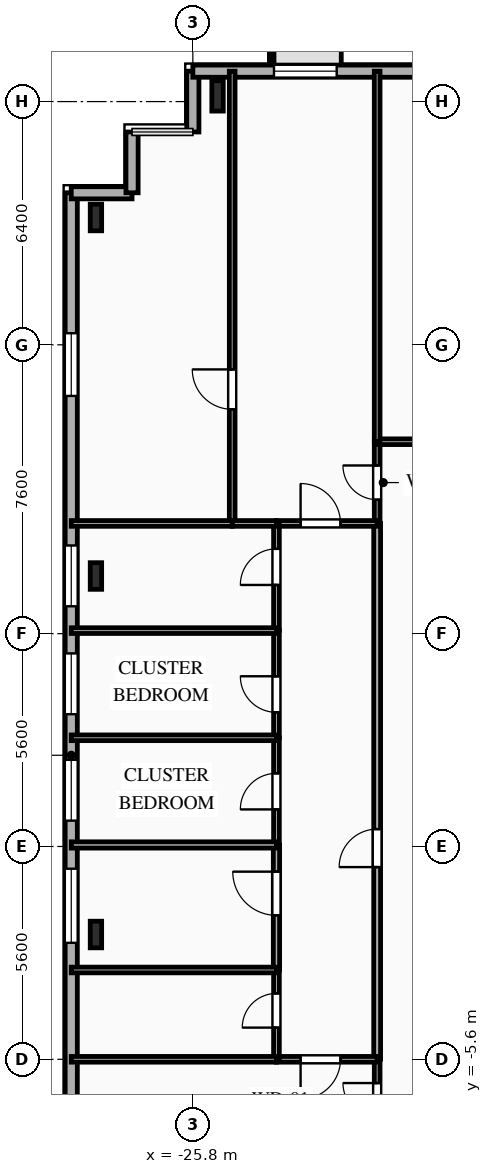
"""IFC4 building model, lengths in metres.
Left out: names, types, materials, properties, quantities, classifications, styles, units other than length and angle.
Written with IfcOpenShell. Run it as: python <this file> out.ifc"""

import sys

from ifc_helpers import new_model, si_unit, direction, frame, frame_2d, origin, origin_2d, place, context, subcontext, project, spatial, rectangle, i_section, extrude, element, fill, save


model = new_model("IFC4")
c1 = context("Model", 3, precision=1e-05, world=origin(), true_north=direction((0.0, 1.0)))
c2 = subcontext(c1, "Body", "Model", "MODEL_VIEW")
j1 = project(units=[si_unit("LENGTHUNIT", "METRE"), si_unit("PLANEANGLEUNIT", "RADIAN")], contexts=[c1])
p1 = place(None, origin())
s1 = spatial("IfcSite", under=j1, at=p1, CompositionType="ELEMENT")
p2 = place(p1, origin())
s2 = spatial("IfcBuilding", under=s1, at=p2, CompositionType="ELEMENT")
p3 = place(p2, frame((0.0, 0.0, 147.75)))
s3 = spatial("IfcBuildingStorey", under=s2, at=p3, CompositionType="ELEMENT", Elevation=147.75)
p4 = place(p3, frame((-25.15, 19.75, 0.0), z_axis=(0.0, 0.0, 1.0), x_axis=(1.0, 0.0, 0.0)))
e1 = element("IfcColumn", 1, at=p4, inside=s3, PredefinedType="COLUMN", context=c2, shape_type="SweptSolid", body=[
    extrude(i_section(OverallWidth=0.3, OverallDepth=0.8, WebThickness=0.018, FlangeThickness=0.033, FilletRadius=0.03, at=origin_2d()), origin(), (0.0, 0.0, 1.0), 3.35),
])
for number, where, z_axis, x_axis in (
    (2, (-28.35, 16.55, 0.0), (0.0, 0.0, 1.0), (1.0, 0.0, 0.0)),
    (3, (-28.35, 7.117, 0.0), (0.0, 0.0, 1.0), (1.0, 0.0, 0.0)),
    (4, (-28.35, -2.317, 0.0), (0.0, 0.0, 1.0), (1.0, 0.0, 0.0)),
):
    element("IfcColumn", number, at=place(p3, frame(where, z_axis=z_axis, x_axis=x_axis)), inside=s3, PredefinedType="COLUMN", context=c2, shape_type="SweptSolid", body=[
        extrude(i_section(OverallWidth=0.3, OverallDepth=0.7, WebThickness=0.017, FlangeThickness=0.032, FilletRadius=0.027, at=origin_2d()), origin(), (0.0, 0.0, 1.0), 3.35),
    ])
p5 = place(p3, frame((-29.0, -12.4, 0.0), z_axis=(0.0, 0.0, 1.0), x_axis=(0.0, 1.0, 0.0)))
e5 = element("IfcWall", 5, at=p5, inside=s3, PredefinedType="SOLIDWALL", context=c2, shape_type="SweptSolid", body=[
    extrude(rectangle(XDim=29.6, YDim=0.32, at=frame_2d((14.8, 0.0))), origin(), (0.0, 0.0, 1.0), 3.04),
])
p6 = place(p5, frame((2.855, 0.0, 0.85)))
e6 = element("IfcOpeningElement", 6, at=p6, cuts=e5, PredefinedType="OPENING", context=c2, shape_type="SweptSolid", body=[
    extrude(rectangle(XDim=1.65, YDim=1.85, at=frame_2d((0.825, 0.925))), frame((0.0, 0.17, 0.0), z_axis=(0.0, -1.0, 0.0), x_axis=(1.0, 0.0, 0.0)), (0.0, 0.0, 1.0), 0.34),
])
p7 = place(p5, frame((9.865, 0.0, 0.85)))
e7 = element("IfcOpeningElement", 7, at=p7, cuts=e5, PredefinedType="OPENING", context=c2, shape_type="SweptSolid", body=[
    extrude(rectangle(XDim=1.95, YDim=1.85, at=frame_2d((0.975, 0.925))), frame((0.0, 0.17, 0.0), z_axis=(0.0, -1.0, 0.0), x_axis=(1.0, 0.0, 0.0)), (0.0, 0.0, 1.0), 0.34),
])
p8 = place(p5, frame((13.08, 0.0, 0.85)))
e8 = element("IfcOpeningElement", 8, at=p8, cuts=e5, PredefinedType="OPENING", context=c2, shape_type="SweptSolid", body=[
    extrude(rectangle(XDim=1.6, YDim=1.85, at=frame_2d((0.8, 0.925))), frame((0.0, 0.17, 0.0), z_axis=(0.0, -1.0, 0.0), x_axis=(1.0, 0.0, 0.0)), (0.0, 0.0, 1.0), 0.34),
])
p9 = place(p5, frame((15.88, 0.0, 0.85)))
e9 = element("IfcOpeningElement", 9, at=p9, cuts=e5, PredefinedType="OPENING", context=c2, shape_type="SweptSolid", body=[
    extrude(rectangle(XDim=1.6, YDim=1.85, at=frame_2d((0.8, 0.925))), frame((0.0, 0.17, 0.0), z_axis=(0.0, -1.0, 0.0), x_axis=(1.0, 0.0, 0.0)), (0.0, 0.0, 1.0), 0.34),
])
p10 = place(p5, frame((18.72, 0.0, 0.85)))
e10 = element("IfcOpeningElement", 10, at=p10, cuts=e5, PredefinedType="OPENING", context=c2, shape_type="SweptSolid", body=[
    extrude(rectangle(XDim=1.6, YDim=1.85, at=frame_2d((0.8, 0.925))), frame((0.0, 0.17, 0.0), z_axis=(0.0, -1.0, 0.0), x_axis=(1.0, 0.0, 0.0)), (0.0, 0.0, 1.0), 0.34),
])
p11 = place(p5, frame((24.255, 0.0, 0.85)))
e11 = element("IfcOpeningElement", 11, at=p11, cuts=e5, PredefinedType="OPENING", context=c2, shape_type="SweptSolid", body=[
    extrude(rectangle(XDim=1.65, YDim=1.85, at=frame_2d((0.825, 0.925))), frame((0.0, 0.17, 0.0), z_axis=(0.0, -1.0, 0.0), x_axis=(1.0, 0.0, 0.0)), (0.0, 0.0, 1.0), 0.34),
])
for number, where, z_axis, x_axis in (
    (12, (-29.0, 17.2, 0.0), (0.0, 0.0, 1.0), (1.0, 0.0, 0.0)),
    (13, (-27.4, 17.2, 0.0), (0.0, 0.0, 1.0), (0.0, 1.0, 0.0)),
):
    element("IfcWall", number, at=place(p3, frame(where, z_axis=z_axis, x_axis=x_axis)), inside=s3, PredefinedType="SOLIDWALL", context=c2, shape_type="SweptSolid", body=[
        extrude(rectangle(XDim=1.6, YDim=0.32, at=frame_2d((0.8, 0.0))), origin(), (0.0, 0.0, 1.0), 3.04),
    ])
p12 = place(p3, frame((-25.8, 18.8, 0.0), z_axis=(0.0, 0.0, 1.0), x_axis=(0.0, 1.0, 0.0)))
e14 = element("IfcWall", 14, at=p12, inside=s3, PredefinedType="SOLIDWALL", context=c2, shape_type="SweptSolid", body=[
    extrude(rectangle(XDim=1.6, YDim=0.32, at=frame_2d((0.8, 0.0))), origin(), (0.0, 0.0, 1.0), 3.04),
])
p13 = place(p3, frame((-25.8, 20.4, 0.0), z_axis=(0.0, 0.0, 1.0), x_axis=(1.0, 0.0, 0.0)))
e15 = element("IfcWall", 15, at=p13, inside=s3, PredefinedType="SOLIDWALL", context=c2, shape_type="SweptSolid", body=[
    extrude(rectangle(XDim=19.2, YDim=0.32, at=frame_2d((9.6, 0.0))), origin(), (0.0, 0.0, 1.0), 3.04),
])
p14 = place(p13, frame((2.135, 0.0, 0.85)))
e16 = element("IfcOpeningElement", 16, at=p14, cuts=e15, PredefinedType="OPENING", context=c2, shape_type="SweptSolid", body=[
    extrude(rectangle(XDim=1.65, YDim=1.85, at=frame_2d((0.825, 0.925))), frame((0.0, 0.17, 0.0), z_axis=(0.0, -1.0, 0.0), x_axis=(1.0, 0.0, 0.0)), (0.0, 0.0, 1.0), 0.34),
])
p15 = place(p13, frame((10.68, 0.0, 0.85)))
e17 = element("IfcOpeningElement", 17, at=p15, cuts=e15, PredefinedType="OPENING", context=c2, shape_type="SweptSolid", body=[
    extrude(rectangle(XDim=2.4, YDim=1.95, at=frame_2d((1.2, 0.975))), frame((0.0, 0.17, 0.0), z_axis=(0.0, -1.0, 0.0), x_axis=(1.0, 0.0, 0.0)), (0.0, 0.0, 1.0), 0.34),
])
p16 = place(p3, frame((-20.95, 8.5, 0.0), z_axis=(0.0, 0.0, 1.0), x_axis=(0.0, 1.0, 0.0)))
e18 = element("IfcWall", 18, at=p16, inside=s3, PredefinedType="PARTITIONING", context=c2, shape_type="SweptSolid", body=[
    extrude(rectangle(XDim=2.15, YDim=0.15, at=frame_2d((1.075, 0.0))), origin(), (0.0, 0.0, 1.0), 3.04),
])
p17 = place(p16, frame((0.625, 0.0, 0.0)))
e19 = element("IfcOpeningElement", 19, at=p17, cuts=e18, PredefinedType="OPENING", context=c2, shape_type="SweptSolid", body=[
    extrude(rectangle(XDim=0.9, YDim=2.1, at=frame_2d((0.45, 1.05))), frame((0.0, 0.085, 0.0), z_axis=(0.0, -1.0, 0.0), x_axis=(1.0, 0.0, 0.0)), (0.0, 0.0, 1.0), 0.17),
])
p18 = place(p3, frame((-20.95, 10.65, 0.0), z_axis=(0.0, 0.0, 1.0), x_axis=(1.0, 0.0, 0.0)))
e20 = element("IfcWall", 20, at=p18, inside=s3, PredefinedType="PARTITIONING", context=c2, shape_type="SweptSolid", body=[
    extrude(rectangle(XDim=13.967, YDim=0.15, at=frame_2d((6.983, 0.0))), origin(), (0.0, 0.0, 1.0), 3.04),
])
p19 = place(p18, frame((6.458, 0.0, 0.0)))
e21 = element("IfcOpeningElement", 21, at=p19, cuts=e20, PredefinedType="OPENING", context=c2, shape_type="SweptSolid", body=[
    extrude(rectangle(XDim=1.05, YDim=2.15, at=frame_2d((0.525, 1.075))), frame((0.0, 0.085, 0.0), z_axis=(0.0, -1.0, 0.0), x_axis=(1.0, 0.0, 0.0)), (0.0, 0.0, 1.0), 0.17),
])
p20 = place(p3, frame((-20.95, -7.75, 0.0), z_axis=(0.0, 0.0, 1.0), x_axis=(0.0, 1.0, 0.0)))
e22 = element("IfcWall", 22, at=p20, inside=s3, PredefinedType="PARTITIONING", context=c2, shape_type="SweptSolid", body=[
    extrude(rectangle(XDim=2.15, YDim=0.15, at=frame_2d((1.075, 0.0))), origin(), (0.0, 0.0, 1.0), 3.04),
])
p21 = place(p20, frame((0.625, 0.0, 0.0)))
e23 = element("IfcOpeningElement", 23, at=p21, cuts=e22, PredefinedType="OPENING", context=c2, shape_type="SweptSolid", body=[
    extrude(rectangle(XDim=0.9, YDim=2.1, at=frame_2d((0.45, 1.05))), frame((0.0, 0.085, 0.0), z_axis=(0.0, -1.0, 0.0), x_axis=(1.0, 0.0, 0.0)), (0.0, 0.0, 1.0), 0.17),
])
p22 = place(p3, frame((-20.95, -5.6, 0.0), z_axis=(0.0, 0.0, 1.0), x_axis=(0.0, 1.0, 0.0)))
e24 = element("IfcWall", 24, at=p22, inside=s3, PredefinedType="PARTITIONING", context=c2, shape_type="SweptSolid", body=[
    extrude(rectangle(XDim=14.1, YDim=0.18, at=frame_2d((7.05, 0.0))), origin(), (0.0, 0.0, 1.0), 3.04),
])
p23 = place(p22, frame((5.058, 0.0, 0.0)))
e25 = element("IfcOpeningElement", 25, at=p23, cuts=e24, PredefinedType="OPENING", context=c2, shape_type="SweptSolid", body=[
    extrude(rectangle(XDim=1.0, YDim=2.15, at=frame_2d((0.5, 1.075))), frame((0.0, 0.1, 0.0), z_axis=(0.0, -1.0, 0.0), x_axis=(1.0, 0.0, 0.0)), (0.0, 0.0, 1.0), 0.2),
])
p24 = place(p3, frame((-23.6, 8.5, 0.0), z_axis=(0.0, 0.0, 1.0), x_axis=(1.0, 0.0, 0.0)))
e26 = element("IfcWall", 26, at=p24, inside=s3, PredefinedType="PARTITIONING", context=c2, shape_type="SweptSolid", body=[
    extrude(rectangle(XDim=2.65, YDim=0.15, at=frame_2d((1.325, 0.0))), origin(), (0.0, 0.0, 1.0), 3.04),
])
p25 = place(p24, frame((0.635, 0.0, 0.0)))
e27 = element("IfcOpeningElement", 27, at=p25, cuts=e26, PredefinedType="OPENING", context=c2, shape_type="SweptSolid", body=[
    extrude(rectangle(XDim=1.05, YDim=2.15, at=frame_2d((0.525, 1.075))), frame((0.0, 0.085, 0.0), z_axis=(0.0, -1.0, 0.0), x_axis=(1.0, 0.0, 0.0)), (0.0, 0.0, 1.0), 0.17),
])
p26 = place(p3, frame((-20.95, -5.6, 0.0), z_axis=(0.0, 0.0, 1.0), x_axis=(-1.0, 0.0, 0.0)))
e28 = element("IfcWall", 28, at=p26, inside=s3, PredefinedType="PARTITIONING", context=c2, shape_type="SweptSolid", body=[
    extrude(rectangle(XDim=2.65, YDim=0.15, at=frame_2d((1.325, 0.0))), origin(), (0.0, 0.0, 1.0), 3.04),
])
p27 = place(p26, frame((0.965, 0.0, 0.0)))
e29 = element("IfcOpeningElement", 29, at=p27, cuts=e28, PredefinedType="OPENING", context=c2, shape_type="SweptSolid", body=[
    extrude(rectangle(XDim=1.05, YDim=2.15, at=frame_2d((0.525, 1.075))), frame((0.0, 0.085, 0.0), z_axis=(0.0, -1.0, 0.0), x_axis=(1.0, 0.0, 0.0)), (0.0, 0.0, 1.0), 0.17),
])
p28 = place(p3, frame((-23.6, -5.6, 0.0), z_axis=(0.0, 0.0, 1.0), x_axis=(0.0, 1.0, 0.0)))
e30 = element("IfcWall", 30, at=p28, inside=s3, PredefinedType="PLUMBINGWALL", context=c2, shape_type="SweptSolid", body=[
    extrude(rectangle(XDim=2.35, YDim=0.15, at=frame_2d((1.175, 0.0))), origin(), (0.0, 0.0, 1.0), 2.695),
])
p29 = place(p28, frame((0.834, 0.0, 0.0)))
e31 = element("IfcOpeningElement", 31, at=p29, cuts=e30, PredefinedType="OPENING", context=c2, shape_type="SweptSolid", body=[
    extrude(rectangle(XDim=0.9, YDim=2.1, at=frame_2d((0.45, 1.05))), frame((0.0, 0.085, 0.0), z_axis=(0.0, -1.0, 0.0), x_axis=(1.0, 0.0, 0.0)), (0.0, 0.0, 1.0), 0.17),
])
p30 = place(p3, frame((-23.6, -3.25, 0.0), z_axis=(0.0, 0.0, 1.0), x_axis=(0.0, 1.0, 0.0)))
e32 = element("IfcWall", 32, at=p30, inside=s3, PredefinedType="PARTITIONING", context=c2, shape_type="SweptSolid", body=[
    extrude(rectangle(XDim=3.29, YDim=0.165, at=frame_2d((1.645, 0.0))), origin(), (0.0, 0.0, 1.0), 2.695),
])
p31 = place(p30, frame((1.438, 0.0, 0.0)))
e33 = element("IfcOpeningElement", 33, at=p31, cuts=e32, PredefinedType="OPENING", context=c2, shape_type="SweptSolid", body=[
    extrude(rectangle(XDim=1.15, YDim=2.15, at=frame_2d((0.575, 1.075))), frame((0.0, 0.093, 0.0), z_axis=(0.0, -1.0, 0.0), x_axis=(1.0, 0.0, 0.0)), (0.0, 0.0, 1.0), 0.185),
])
p32 = place(p3, frame((-23.6, 0.04, 0.0), z_axis=(0.0, 0.0, 1.0), x_axis=(0.0, 1.0, 0.0)))
e34 = element("IfcWall", 34, at=p32, inside=s3, PredefinedType="PARTITIONING", context=c2, shape_type="SweptSolid", body=[
    extrude(rectangle(XDim=2.82, YDim=0.15, at=frame_2d((1.41, 0.0))), origin(), (0.0, 0.0, 1.0), 2.695),
])
p33 = place(p32, frame((0.935, 0.0, 0.0)))
e35 = element("IfcOpeningElement", 35, at=p33, cuts=e34, PredefinedType="OPENING", context=c2, shape_type="SweptSolid", body=[
    extrude(rectangle(XDim=0.95, YDim=2.1, at=frame_2d((0.475, 1.05))), frame((0.0, 0.085, 0.0), z_axis=(0.0, -1.0, 0.0), x_axis=(1.0, 0.0, 0.0)), (0.0, 0.0, 1.0), 0.17),
])
p34 = place(p3, frame((-23.6, 2.86, 0.0), z_axis=(0.0, 0.0, 1.0), x_axis=(0.0, 1.0, 0.0)))
e36 = element("IfcWall", 36, at=p34, inside=s3, PredefinedType="PARTITIONING", context=c2, shape_type="SweptSolid", body=[
    extrude(rectangle(XDim=2.82, YDim=0.15, at=frame_2d((1.41, 0.0))), origin(), (0.0, 0.0, 1.0), 2.695),
])
p35 = place(p34, frame((0.669, 0.0, 0.0)))
e37 = element("IfcOpeningElement", 37, at=p35, cuts=e36, PredefinedType="OPENING", context=c2, shape_type="SweptSolid", body=[
    extrude(rectangle(XDim=0.95, YDim=2.1, at=frame_2d((0.475, 1.05))), frame((0.0, 0.085, 0.0), z_axis=(0.0, -1.0, 0.0), x_axis=(1.0, 0.0, 0.0)), (0.0, 0.0, 1.0), 0.17),
])
p36 = place(p3, frame((-23.6, 5.68, 0.0), z_axis=(0.0, 0.0, 1.0), x_axis=(0.0, 1.0, 0.0)))
e38 = element("IfcWall", 38, at=p36, inside=s3, PredefinedType="PARTITIONING", context=c2, shape_type="SweptSolid", body=[
    extrude(rectangle(XDim=2.82, YDim=0.15, at=frame_2d((1.41, 0.0))), origin(), (0.0, 0.0, 1.0), 2.695),
])
p37 = place(p36, frame((1.201, 0.0, 0.0)))
e39 = element("IfcOpeningElement", 39, at=p37, cuts=e38, PredefinedType="OPENING", context=c2, shape_type="SweptSolid", body=[
    extrude(rectangle(XDim=0.95, YDim=2.1, at=frame_2d((0.475, 1.05))), frame((0.0, 0.085, 0.0), z_axis=(0.0, -1.0, 0.0), x_axis=(1.0, 0.0, 0.0)), (0.0, 0.0, 1.0), 0.17),
])
p38 = place(p3, frame((-24.765, 8.5, 0.0), z_axis=(0.0, 0.0, 1.0), x_axis=(0.0, 1.0, 0.0)))
e40 = element("IfcWall", 40, at=p38, inside=s3, PredefinedType="PARTITIONING", context=c2, shape_type="SweptSolid", body=[
    extrude(rectangle(XDim=11.9, YDim=0.15, at=frame_2d((5.95, 0.0))), origin(), (0.0, 0.0, 1.0), 3.04),
])
p39 = place(p38, frame((3.002, 0.0, 0.0)))
e41 = element("IfcOpeningElement", 41, at=p39, cuts=e40, PredefinedType="OPENING", context=c2, shape_type="SweptSolid", body=[
    extrude(rectangle(XDim=1.05, YDim=2.15, at=frame_2d((0.525, 1.075))), frame((0.0, 0.085, 0.0), z_axis=(0.0, -1.0, 0.0), x_axis=(1.0, 0.0, 0.0)), (0.0, 0.0, 1.0), 0.17),
])
p40 = place(p3, frame((-23.6, 8.5, 0.0), z_axis=(0.0, 0.0, 1.0), x_axis=(-1.0, 0.0, 0.0)))
e42 = element("IfcWall", 42, at=p40, inside=s3, PredefinedType="PARTITIONING", context=c2, shape_type="SweptSolid", body=[
    extrude(rectangle(XDim=1.165, YDim=0.15, at=frame_2d((0.583, 0.0))), origin(), (0.0, 0.0, 1.0), 3.04),
])
p41 = place(p3, frame((-20.95, 20.4, 0.0), z_axis=(0.0, 0.0, 1.0), x_axis=(0.0, -1.0, 0.0)))
e43 = element("IfcWall", 43, at=p41, inside=s3, PredefinedType="PARTITIONING", context=c2, shape_type="SweptSolid", body=[
    extrude(rectangle(XDim=9.75, YDim=0.15, at=frame_2d((4.875, 0.0))), origin(), (0.0, 0.0, 1.0), 3.04),
])
p42 = place(p3, frame((-24.765, 8.5, 0.0), z_axis=(0.0, 0.0, 1.0), x_axis=(-1.0, 0.0, 0.0)))
e44 = element("IfcWall", 44, at=p42, inside=s3, PredefinedType="PARTITIONING", context=c2, shape_type="SweptSolid", body=[
    extrude(rectangle(XDim=4.235, YDim=0.15, at=frame_2d((2.118, 0.0))), origin(), (0.0, 0.0, 1.0), 3.04),
])
for number, where, z_axis, x_axis in (
    (45, (-29.0, -5.6, 0.0), (0.0, 0.0, 1.0), (1.0, 0.0, 0.0)),
    (46, (-29.0, -3.25, 0.0), (0.0, 0.0, 1.0), (1.0, 0.0, 0.0)),
):
    element("IfcWall", number, at=place(p3, frame(where, z_axis=z_axis, x_axis=x_axis)), inside=s3, PredefinedType="PLUMBINGWALL", context=c2, shape_type="SweptSolid", body=[
        extrude(rectangle(XDim=5.4, YDim=0.15, at=frame_2d((2.7, 0.0))), origin(), (0.0, 0.0, 1.0), 3.04),
    ])
p43 = place(p3, frame((-29.0, 0.04, 0.0), z_axis=(0.0, 0.0, 1.0), x_axis=(1.0, 0.0, 0.0)))
e47 = element("IfcWall", 47, at=p43, inside=s3, PredefinedType="PARTITIONING", context=c2, shape_type="SweptSolid", body=[
    extrude(rectangle(XDim=5.4, YDim=0.165, at=frame_2d((2.7, 0.0))), origin(), (0.0, 0.0, 1.0), 3.04),
])
for number, where, z_axis, x_axis in (
    (48, (-29.0, 2.86, 0.0), (0.0, 0.0, 1.0), (1.0, 0.0, 0.0)),
    (49, (-29.0, 5.68, 0.0), (0.0, 0.0, 1.0), (1.0, 0.0, 0.0)),
):
    element("IfcWall", number, at=place(p3, frame(where, z_axis=z_axis, x_axis=x_axis)), inside=s3, PredefinedType="PARTITIONING", context=c2, shape_type="SweptSolid", body=[
        extrude(rectangle(XDim=5.4, YDim=0.15, at=frame_2d((2.7, 0.0))), origin(), (0.0, 0.0, 1.0), 3.04),
    ])
p44 = place(p7, origin())
e50 = element("IfcWindow", 50, at=p44, inside=s3, PartitioningType="SINGLE_PANEL", PredefinedType="WINDOW", context=c2, shape_type="SweptSolid", body=[
    extrude(rectangle(XDim=1.95, YDim=1.85, at=frame_2d((0.975, 0.925))), frame((0.0, 0.03, 0.0), z_axis=(0.0, -1.0, 0.0), x_axis=(1.0, 0.0, 0.0)), (0.0, 0.0, 1.0), 0.06),
])
fill(e7, e50)
p45 = place(p8, origin())
e51 = element("IfcWindow", 51, at=p45, inside=s3, PartitioningType="SINGLE_PANEL", PredefinedType="WINDOW", context=c2, shape_type="SweptSolid", body=[
    extrude(rectangle(XDim=1.6, YDim=1.85, at=frame_2d((0.8, 0.925))), frame((0.0, 0.03, 0.0), z_axis=(0.0, -1.0, 0.0), x_axis=(1.0, 0.0, 0.0)), (0.0, 0.0, 1.0), 0.06),
])
fill(e8, e51)
p46 = place(p9, origin())
e52 = element("IfcWindow", 52, at=p46, inside=s3, PartitioningType="SINGLE_PANEL", PredefinedType="WINDOW", context=c2, shape_type="SweptSolid", body=[
    extrude(rectangle(XDim=1.6, YDim=1.85, at=frame_2d((0.8, 0.925))), frame((0.0, 0.03, 0.0), z_axis=(0.0, -1.0, 0.0), x_axis=(1.0, 0.0, 0.0)), (0.0, 0.0, 1.0), 0.06),
])
fill(e9, e52)
p47 = place(p10, origin())
e53 = element("IfcWindow", 53, at=p47, inside=s3, PartitioningType="SINGLE_PANEL", PredefinedType="WINDOW", context=c2, shape_type="SweptSolid", body=[
    extrude(rectangle(XDim=1.6, YDim=1.85, at=frame_2d((0.8, 0.925))), frame((0.0, 0.03, 0.0), z_axis=(0.0, -1.0, 0.0), x_axis=(1.0, 0.0, 0.0)), (0.0, 0.0, 1.0), 0.06),
])
fill(e10, e53)
p48 = place(p11, origin())
e54 = element("IfcWindow", 54, at=p48, inside=s3, PartitioningType="SINGLE_PANEL", PredefinedType="WINDOW", context=c2, shape_type="SweptSolid", body=[
    extrude(rectangle(XDim=1.65, YDim=1.85, at=frame_2d((0.825, 0.925))), frame((0.0, 0.03, 0.0), z_axis=(0.0, -1.0, 0.0), x_axis=(1.0, 0.0, 0.0)), (0.0, 0.0, 1.0), 0.06),
])
fill(e11, e54)
p49 = place(p14, origin())
e55 = element("IfcWindow", 55, at=p49, inside=s3, PartitioningType="SINGLE_PANEL", PredefinedType="WINDOW", context=c2, shape_type="SweptSolid", body=[
    extrude(rectangle(XDim=1.65, YDim=1.85, at=frame_2d((0.825, 0.925))), frame((0.0, 0.03, 0.0), z_axis=(0.0, -1.0, 0.0), x_axis=(1.0, 0.0, 0.0)), (0.0, 0.0, 1.0), 0.06),
])
fill(e16, e55)
p50 = place(p17, origin())
e56 = element("IfcDoor", 56, at=p50, inside=s3, OperationType="SINGLE_SWING_RIGHT", PredefinedType="DOOR", context=c2, shape_type="SweptSolid", body=[
    extrude(rectangle(XDim=0.9, YDim=2.1, at=frame_2d((0.45, 1.05))), frame((0.0, 0.025, 0.0), z_axis=(0.0, -1.0, 0.0), x_axis=(1.0, 0.0, 0.0)), (0.0, 0.0, 1.0), 0.05),
])
fill(e19, e56)
p51 = place(p21, origin())
e57 = element("IfcDoor", 57, at=p51, inside=s3, OperationType="SINGLE_SWING_RIGHT", PredefinedType="DOOR", context=c2, shape_type="SweptSolid", body=[
    extrude(rectangle(XDim=0.9, YDim=2.1, at=frame_2d((0.45, 1.05))), frame((0.0, 0.025, 0.0), z_axis=(0.0, -1.0, 0.0), x_axis=(1.0, 0.0, 0.0)), (0.0, 0.0, 1.0), 0.05),
])
fill(e23, e57)
p52 = place(p23, origin())
e58 = element("IfcDoor", 58, at=p52, inside=s3, OperationType="SINGLE_SWING_LEFT", PredefinedType="DOOR", context=c2, shape_type="SweptSolid", body=[
    extrude(rectangle(XDim=1.0, YDim=2.15, at=frame_2d((0.5, 1.075))), frame((0.0, 0.025, 0.0), z_axis=(0.0, -1.0, 0.0), x_axis=(1.0, 0.0, 0.0)), (0.0, 0.0, 1.0), 0.05),
])
fill(e25, e58)
p53 = place(p25, origin())
e59 = element("IfcDoor", 59, at=p53, inside=s3, OperationType="SINGLE_SWING_LEFT", PredefinedType="DOOR", context=c2, shape_type="SweptSolid", body=[
    extrude(rectangle(XDim=1.05, YDim=2.15, at=frame_2d((0.525, 1.075))), frame((0.0, 0.025, 0.0), z_axis=(0.0, -1.0, 0.0), x_axis=(1.0, 0.0, 0.0)), (0.0, 0.0, 1.0), 0.05),
])
fill(e27, e59)
p54 = place(p27, origin())
e60 = element("IfcDoor", 60, at=p54, inside=s3, OperationType="SINGLE_SWING_RIGHT", PredefinedType="DOOR", context=c2, shape_type="SweptSolid", body=[
    extrude(rectangle(XDim=1.05, YDim=2.15, at=frame_2d((0.525, 1.075))), frame((0.0, 0.025, 0.0), z_axis=(0.0, -1.0, 0.0), x_axis=(1.0, 0.0, 0.0)), (0.0, 0.0, 1.0), 0.05),
])
fill(e29, e60)
p55 = place(p29, origin())
e61 = element("IfcDoor", 61, at=p55, inside=s3, OperationType="SINGLE_SWING_LEFT", PredefinedType="DOOR", context=c2, shape_type="SweptSolid", body=[
    extrude(rectangle(XDim=0.9, YDim=2.1, at=frame_2d((0.45, 1.05))), frame((0.0, 0.025, 0.0), z_axis=(0.0, -1.0, 0.0), x_axis=(1.0, 0.0, 0.0)), (0.0, 0.0, 1.0), 0.05),
])
fill(e31, e61)
p56 = place(p31, origin())
e62 = element("IfcDoor", 62, at=p56, inside=s3, OperationType="SINGLE_SWING_RIGHT", PredefinedType="DOOR", context=c2, shape_type="SweptSolid", body=[
    extrude(rectangle(XDim=1.15, YDim=2.15, at=frame_2d((0.575, 1.075))), frame((0.0, 0.025, 0.0), z_axis=(0.0, -1.0, 0.0), x_axis=(1.0, 0.0, 0.0)), (0.0, 0.0, 1.0), 0.05),
])
fill(e33, e62)
p57 = place(p33, origin())
e63 = element("IfcDoor", 63, at=p57, inside=s3, OperationType="SINGLE_SWING_LEFT", PredefinedType="DOOR", context=c2, shape_type="SweptSolid", body=[
    extrude(rectangle(XDim=0.95, YDim=2.1, at=frame_2d((0.475, 1.05))), frame((0.0, 0.025, 0.0), z_axis=(0.0, -1.0, 0.0), x_axis=(1.0, 0.0, 0.0)), (0.0, 0.0, 1.0), 0.05),
])
fill(e35, e63)
p58 = place(p35, origin())
e64 = element("IfcDoor", 64, at=p58, inside=s3, OperationType="SINGLE_SWING_RIGHT", PredefinedType="DOOR", context=c2, shape_type="SweptSolid", body=[
    extrude(rectangle(XDim=0.95, YDim=2.1, at=frame_2d((0.475, 1.05))), frame((0.0, 0.025, 0.0), z_axis=(0.0, -1.0, 0.0), x_axis=(1.0, 0.0, 0.0)), (0.0, 0.0, 1.0), 0.05),
])
fill(e37, e64)
p59 = place(p37, origin())
e65 = element("IfcDoor", 65, at=p59, inside=s3, OperationType="SINGLE_SWING_LEFT", PredefinedType="DOOR", context=c2, shape_type="SweptSolid", body=[
    extrude(rectangle(XDim=0.95, YDim=2.1, at=frame_2d((0.475, 1.05))), frame((0.0, 0.025, 0.0), z_axis=(0.0, -1.0, 0.0), x_axis=(1.0, 0.0, 0.0)), (0.0, 0.0, 1.0), 0.05),
])
fill(e39, e65)
p60 = place(p39, origin())
e66 = element("IfcDoor", 66, at=p60, inside=s3, OperationType="SINGLE_SWING_RIGHT", PredefinedType="DOOR", context=c2, shape_type="SweptSolid", body=[
    extrude(rectangle(XDim=1.05, YDim=2.15, at=frame_2d((0.525, 1.075))), frame((0.0, 0.025, 0.0), z_axis=(0.0, -1.0, 0.0), x_axis=(1.0, 0.0, 0.0)), (0.0, 0.0, 1.0), 0.05),
])
fill(e41, e66)
save(model, sys.argv[1])
